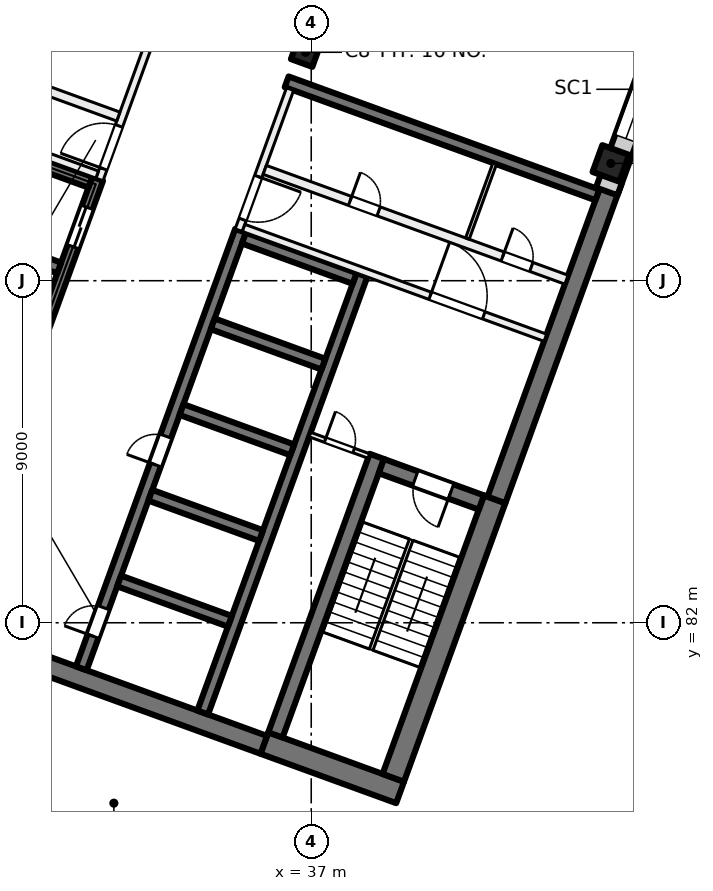
"""IFC4 building model, lengths in metres.
Left out: names, types, materials, properties, quantities, classifications, styles, units other than length and angle.
Written with IfcOpenShell. Run it as: python <this file> out.ifc"""

import sys

from ifc_helpers import new_model, si_unit, direction, frame, frame_2d, origin, origin_2d, place, context, subcontext, project, spatial, rectangle, extrude, element, fill, save


model = new_model("IFC4")
c1 = context("Model", 3, precision=1e-05, world=origin(), true_north=direction((0.0, 1.0)))
c2 = subcontext(c1, "Body", "Model", "MODEL_VIEW")
j1 = project(units=[si_unit("LENGTHUNIT", "METRE"), si_unit("PLANEANGLEUNIT", "RADIAN")], contexts=[c1])
p1 = place(None, origin())
s1 = spatial("IfcSite", under=j1, at=p1, CompositionType="ELEMENT")
p2 = place(p1, origin())
s2 = spatial("IfcBuilding", under=s1, at=p2, CompositionType="ELEMENT")
p3 = place(p2, frame((0.0, 0.0, 220.0)))
s3 = spatial("IfcBuildingStorey", under=s2, at=p3, CompositionType="ELEMENT", Elevation=220.0)
p4 = place(p3, frame((36.849, 97.011, 0.0), z_axis=(0.0, 0.0, 1.0), x_axis=(-0.342020143326, -0.939692620786, 0.0)))
e1 = element("IfcColumn", 1, at=p4, inside=s3, PredefinedType="COLUMN", context=c2, shape_type="SweptSolid", body=[
    extrude(rectangle(XDim=0.6, YDim=0.6, at=origin_2d()), origin(), (0.0, 0.0, 1.0), 4.0),
])
p5 = place(p3, frame((44.884, 94.087, 0.0), z_axis=(0.0, 0.0, 1.0), x_axis=(-0.342020143326, -0.939692620786, 0.0)))
e2 = element("IfcColumn", 2, at=p5, inside=s3, PredefinedType="COLUMN", context=c2, shape_type="SweptSolid", body=[
    extrude(rectangle(XDim=0.75, YDim=0.75, at=origin_2d()), origin(), (0.0, 0.0, 1.0), 4.0),
])
p6 = place(p3, frame((39.338, 77.535, 0.0), z_axis=(0.0, 0.0, 1.0), x_axis=(-0.939701471648, 0.341995824804, 0.0)))
e3 = element("IfcWall", 3, at=p6, inside=s3, PredefinedType="SHEAR", context=c2, shape_type="SweptSolid", body=[
    extrude(rectangle(XDim=3.8, YDim=0.6, at=frame_2d((1.9, 0.0))), origin(), (0.0, 0.0, 1.0), 4.0),
])
p7 = place(p3, frame((35.75, 78.788, 0.0), z_axis=(0.0, 0.0, 1.0), x_axis=(-0.939692894512, 0.342019391267, 0.0)))
e4 = element("IfcWall", 4, at=p7, inside=s3, PredefinedType="SHEAR", context=c2, shape_type="SweptSolid", body=[
    extrude(rectangle(XDim=14.4, YDim=0.5, at=frame_2d((7.2, 0.0))), origin(), (0.0, 0.0, 1.0), 4.0),
])
p8 = place(p3, frame((39.159, 77.92, 0.0), z_axis=(0.0, 0.0, 1.0), x_axis=(0.342016982193, 0.939693771338, 0.0)))
e5 = element("IfcWall", 5, at=p8, inside=s3, PredefinedType="SHEAR", context=c2, shape_type="SweptSolid", body=[
    extrude(rectangle(XDim=7.8, YDim=0.6, at=frame_2d((3.9, 0.0))), origin(), (0.0, 0.0, 1.0), 4.0),
])
p9 = place(p3, frame((41.874, 85.232, 0.0), z_axis=(0.0, 0.0, 1.0), x_axis=(0.342020437038, 0.939692513883, 0.0)))
e6 = element("IfcWall", 6, at=p9, inside=s3, PredefinedType="SHEAR", context=c2, shape_type="SweptSolid", body=[
    extrude(rectangle(XDim=8.975, YDim=0.5, at=frame_2d((4.487, 0.0))), origin(), (0.0, 0.0, 1.0), 4.0),
])
p10 = place(p3, frame((36.058, 79.048, 0.0), z_axis=(0.0, 0.0, 1.0), x_axis=(0.342016982193, 0.939693771338, 0.0)))
e7 = element("IfcWall", 7, at=p10, inside=s3, PredefinedType="SHEAR", context=c2, shape_type="SweptSolid", body=[
    extrude(rectangle(XDim=7.8, YDim=0.4, at=frame_2d((3.9, 0.0))), origin(), (0.0, 0.0, 1.0), 4.0),
])
p11 = place(p3, frame((41.476, 85.164, 0.0), z_axis=(0.0, 0.0, 1.0), x_axis=(-0.939678810556, 0.342058084236, 0.0)))
e8 = element("IfcWall", 8, at=p11, inside=s3, PredefinedType="SHEAR", context=c2, shape_type="SweptSolid", body=[
    extrude(rectangle(XDim=2.8, YDim=0.4, at=frame_2d((1.4, 0.0))), origin(), (0.0, 0.0, 1.0), 4.0),
])
p12 = place(p11, frame((0.85, 0.0, 0.0)))
e9 = element("IfcOpeningElement", 9, at=p12, cuts=e8, PredefinedType="OPENING", context=c2, shape_type="SweptSolid", body=[
    extrude(rectangle(XDim=1.0, YDim=2.1, at=frame_2d((0.5, 1.05))), frame((0.0, 0.21, 0.0), z_axis=(0.0, -1.0, 0.0), x_axis=(1.0, 0.0, 0.0)), (0.0, 0.0, 1.0), 0.42),
])
p13 = place(p3, frame((30.949, 80.801, 0.0), z_axis=(0.0, 0.0, 1.0), x_axis=(0.342016684409, 0.939693879721, 0.0)))
e10 = element("IfcWall", 10, at=p13, inside=s3, PredefinedType="SHEAR", context=c2, shape_type="SweptSolid", body=[
    extrude(rectangle(XDim=12.25, YDim=0.3, at=frame_2d((6.125, 0.0))), origin(), (0.0, 0.0, 1.0), 4.0),
])
p14 = place(p13, frame((0.9, 0.0, 0.0)))
e11 = element("IfcOpeningElement", 11, at=p14, cuts=e10, PredefinedType="OPENING", context=c2, shape_type="SweptSolid", body=[
    extrude(rectangle(XDim=0.8, YDim=2.1, at=frame_2d((0.4, 1.05))), frame((0.0, 0.16, 0.0), z_axis=(0.0, -1.0, 0.0), x_axis=(1.0, 0.0, 0.0)), (0.0, 0.0, 1.0), 0.32),
])
p15 = place(p13, frame((5.7, 0.0, 0.0)))
e12 = element("IfcOpeningElement", 12, at=p15, cuts=e10, PredefinedType="OPENING", context=c2, shape_type="SweptSolid", body=[
    extrude(rectangle(XDim=0.8, YDim=2.1, at=frame_2d((0.4, 1.05))), frame((0.0, 0.16, 0.0), z_axis=(0.0, -1.0, 0.0), x_axis=(1.0, 0.0, 0.0)), (0.0, 0.0, 1.0), 0.32),
])
p16 = place(p3, frame((34.144, 79.638, 0.0), z_axis=(0.0, 0.0, 1.0), x_axis=(0.342016684409, 0.939693879721, 0.0)))
e13 = element("IfcWall", 13, at=p16, inside=s3, PredefinedType="SHEAR", context=c2, shape_type="SweptSolid", body=[
    extrude(rectangle(XDim=12.25, YDim=0.3, at=frame_2d((6.125, 0.0))), origin(), (0.0, 0.0, 1.0), 4.0),
])
p17 = place(p3, frame((34.858, 82.039, 0.0), z_axis=(0.0, 0.0, 1.0), x_axis=(-0.939689908313, 0.342027595692, 0.0)))
e14 = element("IfcWall", 14, at=p17, inside=s3, PredefinedType="SHEAR", context=c2, shape_type="SweptSolid", body=[
    extrude(rectangle(XDim=3.1, YDim=0.3, at=frame_2d((1.55, 0.0))), origin(), (0.0, 0.0, 1.0), 4.0),
])
p18 = place(p3, frame((35.679, 84.294, 0.0), z_axis=(0.0, 0.0, 1.0), x_axis=(-0.939706007505, 0.341983361377, 0.0)))
e15 = element("IfcWall", 15, at=p18, inside=s3, PredefinedType="SHEAR", context=c2, shape_type="SweptSolid", body=[
    extrude(rectangle(XDim=3.1, YDim=0.3, at=frame_2d((1.55, 0.0))), origin(), (0.0, 0.0, 1.0), 4.0),
])
for number, where, z_axis, x_axis in (
    (16, (36.5, 86.549, 0.0), (0.0, 0.0, 1.0), (-0.94, 0.342, 0.0)),
    (17, (37.321, 88.805, 0.0), (0.0, 0.0, 1.0), (-0.94, 0.342, 0.0)),
    (18, (38.142, 91.06, 0.0), (0.0, 0.0, 1.0), (-0.94, 0.342, 0.0)),
):
    element("IfcWall", number, at=place(p3, frame(where, z_axis=z_axis, x_axis=x_axis)), inside=s3, PredefinedType="SHEAR", context=c2, shape_type="SweptSolid", body=[
        extrude(rectangle(XDim=3.1, YDim=0.3, at=frame_2d((1.55, 0.0))), origin(), (0.0, 0.0, 1.0), 4.0),
    ])
p19 = place(p3, frame((27.191, 82.169, 0.0), z_axis=(0.0, 0.0, 1.0), x_axis=(0.342016684409, 0.939693879721, 0.0)))
e19 = element("IfcWall", 19, at=p19, inside=s3, PredefinedType="SHEAR", context=c2, shape_type="SweptSolid", body=[
    extrude(rectangle(XDim=12.25, YDim=0.3, at=frame_2d((6.125, 0.0))), origin(), (0.0, 0.0, 1.0), 4.0),
])
p20 = place(p19, frame((0.75, 0.0, 0.0)))
e20 = element("IfcOpeningElement", 20, at=p20, cuts=e19, PredefinedType="OPENING", context=c2, shape_type="SweptSolid", body=[
    extrude(rectangle(XDim=1.1, YDim=2.1, at=frame_2d((0.55, 1.05))), frame((0.0, 0.16, 0.0), z_axis=(0.0, -1.0, 0.0), x_axis=(1.0, 0.0, 0.0)), (0.0, 0.0, 1.0), 0.32),
])
p21 = place(p19, frame((3.15, 0.0, 0.0)))
e21 = element("IfcOpeningElement", 21, at=p21, cuts=e19, PredefinedType="OPENING", context=c2, shape_type="SweptSolid", body=[
    extrude(rectangle(XDim=1.1, YDim=2.1, at=frame_2d((0.55, 1.05))), frame((0.0, 0.16, 0.0), z_axis=(0.0, -1.0, 0.0), x_axis=(1.0, 0.0, 0.0)), (0.0, 0.0, 1.0), 0.32),
])
p22 = place(p19, frame((5.55, 0.0, 0.0)))
e22 = element("IfcOpeningElement", 22, at=p22, cuts=e19, PredefinedType="OPENING", context=c2, shape_type="SweptSolid", body=[
    extrude(rectangle(XDim=1.1, YDim=2.1, at=frame_2d((0.55, 1.05))), frame((0.0, 0.16, 0.0), z_axis=(0.0, -1.0, 0.0), x_axis=(1.0, 0.0, 0.0)), (0.0, 0.0, 1.0), 0.32),
])
p23 = place(p19, frame((10.35, 0.0, 0.0)))
e23 = element("IfcOpeningElement", 23, at=p23, cuts=e19, PredefinedType="OPENING", context=c2, shape_type="SweptSolid", body=[
    extrude(rectangle(XDim=1.1, YDim=2.1, at=frame_2d((0.55, 1.05))), frame((0.0, 0.16, 0.0), z_axis=(0.0, -1.0, 0.0), x_axis=(1.0, 0.0, 0.0)), (0.0, 0.0, 1.0), 0.32),
])
for number, where, z_axis, x_axis in (
    (24, (30.367, 91.336, 0.0), (0.0, 0.0, 1.0), (-0.94, 0.342, 0.0)),
    (25, (31.188, 93.591, 0.0), (0.0, 0.0, 1.0), (-0.94, 0.342, 0.0)),
):
    element("IfcWall", number, at=place(p3, frame(where, z_axis=z_axis, x_axis=x_axis)), inside=s3, PredefinedType="SHEAR", context=c2, shape_type="SweptSolid", body=[
        extrude(rectangle(XDim=3.1, YDim=0.3, at=frame_2d((1.55, 0.0))), origin(), (0.0, 0.0, 1.0), 4.0),
    ])
p24 = place(p3, frame((44.529, 93.258, 0.0), z_axis=(0.0, 0.0, 1.0), x_axis=(-0.9396917844, 0.342022441267, 0.0)))
e26 = element("IfcWall", 26, at=p24, inside=s3, PredefinedType="SHEAR", context=c2, shape_type="SweptSolid", body=[
    extrude(rectangle(XDim=8.7, YDim=0.3, at=frame_2d((4.35, 0.0))), origin(), (0.0, 0.0, 1.0), 4.0),
])
p25 = place(p3, frame((52.212, 113.783, 0.0), z_axis=(0.0, 0.0, 1.0), x_axis=(-0.34202521188, -0.939690775968, 0.0)))
e27 = element("IfcWall", 27, at=p25, inside=s3, PredefinedType="SOLIDWALL", context=c2, shape_type="SweptSolid", body=[
    extrude(rectangle(XDim=21.745, YDim=0.6, at=frame_2d((10.873, 0.0))), origin(), (0.0, 0.0, 1.0), 3.625),
])
p26 = place(p25, frame((3.765, 0.0, 0.9)))
e28 = element("IfcOpeningElement", 28, at=p26, cuts=e27, PredefinedType="OPENING", context=c2, shape_type="SweptSolid", body=[
    extrude(rectangle(XDim=3.0, YDim=2.4, at=frame_2d((1.5, 1.2))), frame((0.0, 0.31, 0.0), z_axis=(0.0, -1.0, 0.0), x_axis=(1.0, 0.0, 0.0)), (0.0, 0.0, 1.0), 0.62),
])
p27 = place(p25, frame((8.265, 0.0, 0.9)))
e29 = element("IfcOpeningElement", 29, at=p27, cuts=e27, PredefinedType="OPENING", context=c2, shape_type="SweptSolid", body=[
    extrude(rectangle(XDim=3.0, YDim=2.4, at=frame_2d((1.5, 1.2))), frame((0.0, 0.31, 0.0), z_axis=(0.0, -1.0, 0.0), x_axis=(1.0, 0.0, 0.0)), (0.0, 0.0, 1.0), 0.62),
])
p28 = place(p25, frame((12.765, 0.0, 0.9)))
e30 = element("IfcOpeningElement", 30, at=p28, cuts=e27, PredefinedType="OPENING", context=c2, shape_type="SweptSolid", body=[
    extrude(rectangle(XDim=3.0, YDim=2.4, at=frame_2d((1.5, 1.2))), frame((0.0, 0.31, 0.0), z_axis=(0.0, -1.0, 0.0), x_axis=(1.0, 0.0, 0.0)), (0.0, 0.0, 1.0), 0.62),
])
p29 = place(p25, frame((17.265, 0.0, 0.9)))
e31 = element("IfcOpeningElement", 31, at=p29, cuts=e27, PredefinedType="OPENING", context=c2, shape_type="SweptSolid", body=[
    extrude(rectangle(XDim=3.0, YDim=2.4, at=frame_2d((1.5, 1.2))), frame((0.0, 0.31, 0.0), z_axis=(0.0, -1.0, 0.0), x_axis=(1.0, 0.0, 0.0)), (0.0, 0.0, 1.0), 0.62),
])
p30 = place(p3, frame((31.427, 93.663, 0.0), z_axis=(0.0, 0.0, 1.0), x_axis=(0.342030870568, 0.93968871632, 0.0)))
e32 = element("IfcWall", 32, at=p30, inside=s3, PredefinedType="PARTITIONING", context=c2, shape_type="SweptSolid", body=[
    extrude(rectangle(XDim=3.95, YDim=0.2, at=frame_2d((1.975, 0.0))), origin(), (0.0, 0.0, 1.0), 3.625),
])
p31 = place(p30, frame((0.3, 0.0, 0.0)))
e33 = element("IfcOpeningElement", 33, at=p31, cuts=e32, PredefinedType="OPENING", context=c2, shape_type="SweptSolid", body=[
    extrude(rectangle(XDim=1.2, YDim=2.1, at=frame_2d((0.6, 1.05))), frame((0.0, 0.11, 0.0), z_axis=(0.0, -1.0, 0.0), x_axis=(1.0, 0.0, 0.0)), (0.0, 0.0, 1.0), 0.22),
])
p32 = place(p3, frame((23.427, 96.682, 0.0), z_axis=(0.0, 0.0, 1.0), x_axis=(0.939690465531, -0.342026064782, 0.0)))
e34 = element("IfcWall", 34, at=p32, inside=s3, PredefinedType="PARTITIONING", context=c2, shape_type="SweptSolid", body=[
    extrude(rectangle(XDim=8.45, YDim=0.2, at=frame_2d((4.225, 0.0))), origin(), (0.0, 0.0, 1.0), 3.625),
])
p33 = place(p32, frame((1.725, 0.0, 0.0)))
e35 = element("IfcOpeningElement", 35, at=p33, cuts=e34, PredefinedType="OPENING", context=c2, shape_type="SweptSolid", body=[
    extrude(rectangle(XDim=1.5, YDim=2.1, at=frame_2d((0.75, 1.05))), frame((0.0, 0.11, 0.0), z_axis=(0.0, -1.0, 0.0), x_axis=(1.0, 0.0, 0.0)), (0.0, 0.0, 1.0), 0.22),
])
p34 = place(p3, frame((23.983, 98.208, 0.0), z_axis=(0.0, 0.0, 1.0), x_axis=(0.939699751196, -0.342000552051, 0.0)))
e36 = element("IfcWall", 36, at=p34, inside=s3, PredefinedType="PARTITIONING", context=c2, shape_type="SweptSolid", body=[
    extrude(rectangle(XDim=8.45, YDim=0.25, at=frame_2d((4.225, 0.0))), origin(), (0.0, 0.0, 1.0), 3.625),
])
p35 = place(p34, frame((3.825, 0.0, 0.0)))
e37 = element("IfcOpeningElement", 37, at=p35, cuts=e36, PredefinedType="OPENING", context=c2, shape_type="SweptSolid", body=[
    extrude(rectangle(XDim=0.8, YDim=2.1, at=frame_2d((0.4, 1.05))), frame((0.0, 0.135, 0.0), z_axis=(0.0, -1.0, 0.0), x_axis=(1.0, 0.0, 0.0)), (0.0, 0.0, 1.0), 0.27),
])
p36 = place(p3, frame((36.443, 96.041, 0.0), z_axis=(0.0, 0.0, 1.0), x_axis=(-0.341996156931, -0.939701350773, 0.0)))
e38 = element("IfcWall", 38, at=p36, inside=s3, PredefinedType="PARTITIONING", context=c2, shape_type="SweptSolid", body=[
    extrude(rectangle(XDim=3.95, YDim=0.2, at=frame_2d((1.975, 0.0))), origin(), (0.0, 0.0, 1.0), 3.625),
])
p37 = place(p36, frame((2.45, 0.0, 0.0)))
e39 = element("IfcOpeningElement", 39, at=p37, cuts=e38, PredefinedType="OPENING", context=c2, shape_type="SweptSolid", body=[
    extrude(rectangle(XDim=1.2, YDim=2.1, at=frame_2d((0.6, 1.05))), frame((0.0, 0.11, 0.0), z_axis=(0.0, -1.0, 0.0), x_axis=(1.0, 0.0, 0.0)), (0.0, 0.0, 1.0), 0.22),
])
p38 = place(p3, frame((35.22, 92.389, 0.0), z_axis=(0.0, 0.0, 1.0), x_axis=(0.939690465531, -0.342026064782, 0.0)))
e40 = element("IfcWall", 40, at=p38, inside=s3, PredefinedType="PARTITIONING", context=c2, shape_type="SweptSolid", body=[
    extrude(rectangle(XDim=8.45, YDim=0.2, at=frame_2d((4.225, 0.0))), origin(), (0.0, 0.0, 1.0), 3.625),
])
p39 = place(p38, frame((5.225, 0.0, 0.0)))
e41 = element("IfcOpeningElement", 41, at=p39, cuts=e40, PredefinedType="OPENING", context=c2, shape_type="SweptSolid", body=[
    extrude(rectangle(XDim=1.5, YDim=2.1, at=frame_2d((0.75, 1.05))), frame((0.0, 0.11, 0.0), z_axis=(0.0, -1.0, 0.0), x_axis=(1.0, 0.0, 0.0)), (0.0, 0.0, 1.0), 0.22),
])
p40 = place(p3, frame((35.776, 93.916, 0.0), z_axis=(0.0, 0.0, 1.0), x_axis=(0.939690465531, -0.342026064782, 0.0)))
e42 = element("IfcWall", 42, at=p40, inside=s3, PredefinedType="PARTITIONING", context=c2, shape_type="SweptSolid", body=[
    extrude(rectangle(XDim=8.45, YDim=0.25, at=frame_2d((4.225, 0.0))), origin(), (0.0, 0.0, 1.0), 3.625),
])
p41 = place(p40, frame((2.39, 0.0, 0.0)))
e43 = element("IfcOpeningElement", 43, at=p41, cuts=e42, PredefinedType="OPENING", context=c2, shape_type="SweptSolid", body=[
    extrude(rectangle(XDim=0.8, YDim=2.1, at=frame_2d((0.4, 1.05))), frame((0.0, 0.135, 0.0), z_axis=(0.0, -1.0, 0.0), x_axis=(1.0, 0.0, 0.0)), (0.0, 0.0, 1.0), 0.27),
])
p42 = place(p40, frame((6.665, 0.0, 0.0)))
e44 = element("IfcOpeningElement", 44, at=p42, cuts=e42, PredefinedType="OPENING", context=c2, shape_type="SweptSolid", body=[
    extrude(rectangle(XDim=0.8, YDim=2.1, at=frame_2d((0.4, 1.05))), frame((0.0, 0.135, 0.0), z_axis=(0.0, -1.0, 0.0), x_axis=(1.0, 0.0, 0.0)), (0.0, 0.0, 1.0), 0.27),
])
p43 = place(p3, frame((36.966, 86.952, 0.0), z_axis=(0.0, 0.0, 1.0), x_axis=(0.939672407396, -0.342075674051, 0.0)))
e45 = element("IfcWall", 45, at=p43, inside=s3, PredefinedType="PARTITIONING", context=c2, shape_type="SweptSolid", body=[
    extrude(rectangle(XDim=1.65, YDim=0.125, at=frame_2d((0.825, 0.0))), origin(), (0.0, 0.0, 1.0), 3.625),
])
p44 = place(p43, frame((0.425, 0.0, 0.0)))
e46 = element("IfcOpeningElement", 46, at=p44, cuts=e45, PredefinedType="OPENING", context=c2, shape_type="SweptSolid", body=[
    extrude(rectangle(XDim=0.8, YDim=2.1, at=frame_2d((0.4, 1.05))), frame((0.0, 0.073, 0.0), z_axis=(0.0, -1.0, 0.0), x_axis=(1.0, 0.0, 0.0)), (0.0, 0.0, 1.0), 0.145),
])
p45 = place(p3, frame((41.828, 94.082, 0.0), z_axis=(0.0, 0.0, 1.0), x_axis=(-0.342023078919, -0.939691552312, 0.0)))
e47 = element("IfcWall", 47, at=p45, inside=s3, PredefinedType="PARTITIONING", context=c2, shape_type="SweptSolid", body=[
    extrude(rectangle(XDim=2.1, YDim=0.1, at=frame_2d((1.05, 0.0))), origin(), (0.0, 0.0, 1.0), 3.625),
])
p46 = place(p29, origin())
e48 = element("IfcWindow", 48, at=p46, inside=s3, PartitioningType="SINGLE_PANEL", PredefinedType="WINDOW", context=c2, shape_type="SweptSolid", body=[
    extrude(rectangle(XDim=3.0, YDim=2.4, at=frame_2d((1.5, 1.2))), frame((0.0, 0.03, 0.0), z_axis=(0.0, -1.0, 0.0), x_axis=(1.0, 0.0, 0.0)), (0.0, 0.0, 1.0), 0.06),
])
fill(e31, e48)
p47 = place(p23, origin())
e49 = element("IfcDoor", 49, at=p47, inside=s3, OperationType="DOUBLE_DOOR_SLIDING", PredefinedType="DOOR", context=c2, shape_type="SweptSolid", body=[
    extrude(rectangle(XDim=1.1, YDim=2.1, at=frame_2d((0.55, 1.05))), frame((0.0, 0.025, 0.0), z_axis=(0.0, -1.0, 0.0), x_axis=(1.0, 0.0, 0.0)), (0.0, 0.0, 1.0), 0.05),
])
fill(e23, e49)
p48 = place(p14, origin())
e50 = element("IfcDoor", 50, at=p48, inside=s3, OperationType="SINGLE_SWING_LEFT", PredefinedType="DOOR", context=c2, shape_type="SweptSolid", body=[
    extrude(rectangle(XDim=0.8, YDim=2.1, at=frame_2d((0.4, 1.05))), frame((0.0, 0.025, 0.0), z_axis=(0.0, -1.0, 0.0), x_axis=(1.0, 0.0, 0.0)), (0.0, 0.0, 1.0), 0.05),
])
fill(e11, e50)
p49 = place(p15, origin())
e51 = element("IfcDoor", 51, at=p49, inside=s3, OperationType="SINGLE_SWING_RIGHT", PredefinedType="DOOR", context=c2, shape_type="SweptSolid", body=[
    extrude(rectangle(XDim=0.8, YDim=2.1, at=frame_2d((0.4, 1.05))), frame((0.0, 0.025, 0.0), z_axis=(0.0, -1.0, 0.0), x_axis=(1.0, 0.0, 0.0)), (0.0, 0.0, 1.0), 0.05),
])
fill(e12, e51)
p50 = place(p31, origin())
e52 = element("IfcDoor", 52, at=p50, inside=s3, OperationType="DOUBLE_DOOR_SINGLE_SWING", PredefinedType="DOOR", context=c2, shape_type="SweptSolid", body=[
    extrude(rectangle(XDim=1.2, YDim=2.1, at=frame_2d((0.6, 1.05))), frame((0.0, 0.025, 0.0), z_axis=(0.0, -1.0, 0.0), x_axis=(1.0, 0.0, 0.0)), (0.0, 0.0, 1.0), 0.05),
])
fill(e33, e52)
p51 = place(p37, origin())
e53 = element("IfcDoor", 53, at=p51, inside=s3, OperationType="DOUBLE_DOOR_SINGLE_SWING", PredefinedType="DOOR", context=c2, shape_type="SweptSolid", body=[
    extrude(rectangle(XDim=1.2, YDim=2.1, at=frame_2d((0.6, 1.05))), frame((0.0, 0.025, 0.0), z_axis=(0.0, -1.0, 0.0), x_axis=(1.0, 0.0, 0.0)), (0.0, 0.0, 1.0), 0.05),
])
fill(e39, e53)
p52 = place(p39, origin())
e54 = element("IfcDoor", 54, at=p52, inside=s3, OperationType="DOUBLE_DOOR_SINGLE_SWING", PredefinedType="DOOR", context=c2, shape_type="SweptSolid", body=[
    extrude(rectangle(XDim=1.5, YDim=2.1, at=frame_2d((0.75, 1.05))), frame((0.0, 0.025, 0.0), z_axis=(0.0, -1.0, 0.0), x_axis=(1.0, 0.0, 0.0)), (0.0, 0.0, 1.0), 0.05),
])
fill(e41, e54)
p53 = place(p12, origin())
e55 = element("IfcDoor", 55, at=p53, inside=s3, OperationType="SINGLE_SWING_RIGHT", PredefinedType="DOOR", context=c2, shape_type="SweptSolid", body=[
    extrude(rectangle(XDim=1.0, YDim=2.1, at=frame_2d((0.5, 1.05))), frame((0.0, 0.025, 0.0), z_axis=(0.0, -1.0, 0.0), x_axis=(1.0, 0.0, 0.0)), (0.0, 0.0, 1.0), 0.05),
])
fill(e9, e55)
p54 = place(p44, origin())
e56 = element("IfcDoor", 56, at=p54, inside=s3, OperationType="SINGLE_SWING_LEFT", PredefinedType="DOOR", context=c2, shape_type="SweptSolid", body=[
    extrude(rectangle(XDim=0.8, YDim=2.1, at=frame_2d((0.4, 1.05))), frame((0.0, 0.025, 0.0), z_axis=(0.0, -1.0, 0.0), x_axis=(1.0, 0.0, 0.0)), (0.0, 0.0, 1.0), 0.05),
])
fill(e46, e56)
p55 = place(p41, origin())
e57 = element("IfcDoor", 57, at=p55, inside=s3, OperationType="SINGLE_SWING_RIGHT", PredefinedType="DOOR", context=c2, shape_type="SweptSolid", body=[
    extrude(rectangle(XDim=0.8, YDim=2.1, at=frame_2d((0.4, 1.05))), frame((0.0, 0.025, 0.0), z_axis=(0.0, -1.0, 0.0), x_axis=(1.0, 0.0, 0.0)), (0.0, 0.0, 1.0), 0.05),
])
fill(e43, e57)
p56 = place(p42, origin())
e58 = element("IfcDoor", 58, at=p56, inside=s3, OperationType="SINGLE_SWING_LEFT", PredefinedType="DOOR", context=c2, shape_type="SweptSolid", body=[
    extrude(rectangle(XDim=0.8, YDim=2.1, at=frame_2d((0.4, 1.05))), frame((0.0, 0.025, 0.0), z_axis=(0.0, -1.0, 0.0), x_axis=(1.0, 0.0, 0.0)), (0.0, 0.0, 1.0), 0.05),
])
fill(e44, e58)
save(model, sys.argv[1])
